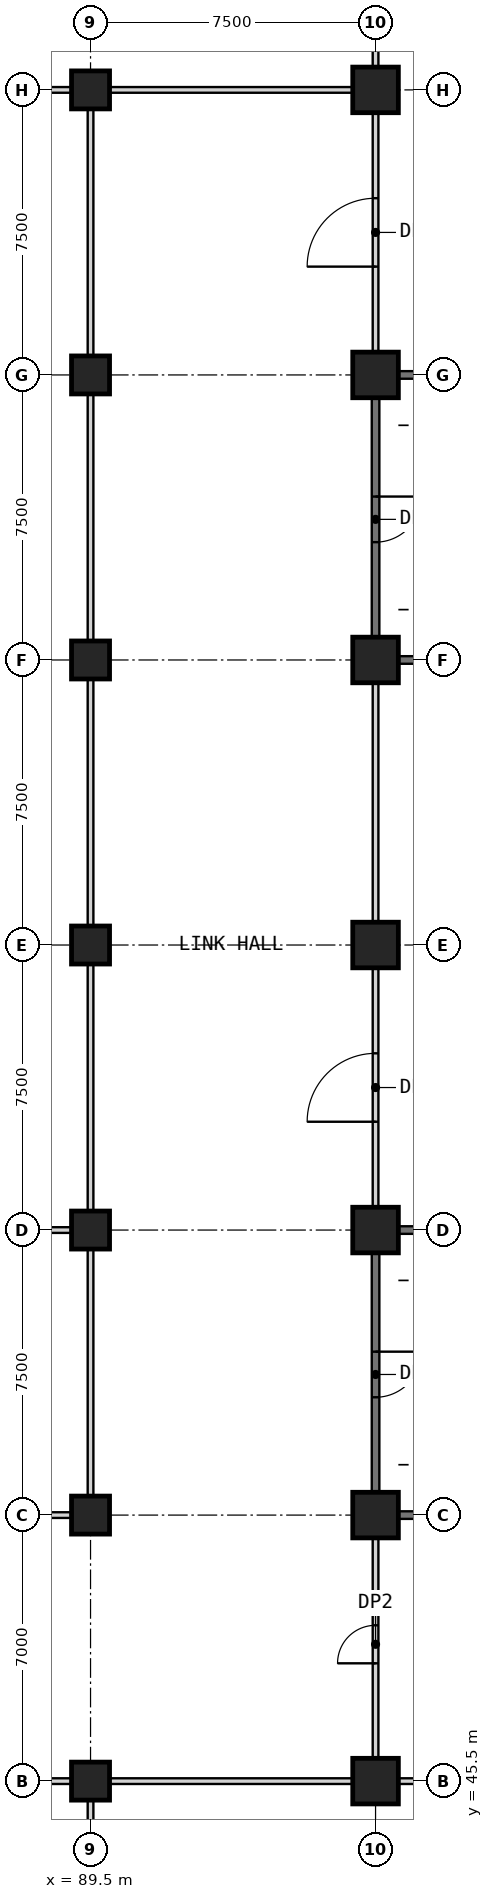
"""IFC4 building model, lengths in metres.
Left out: names, types, materials, properties, quantities, classifications, styles, units other than length and angle.
Written with IfcOpenShell. Run it as: python <this file> out.ifc"""

import sys

from ifc_helpers import new_model, si_unit, direction, frame, frame_2d, origin, origin_2d, place, context, subcontext, project, spatial, rectangle, extrude, element, fill, save


model = new_model("IFC4")
c1 = context("Model", 3, precision=1e-05, world=origin(), true_north=direction((0.0, 1.0)))
c2 = subcontext(c1, "Body", "Model", "MODEL_VIEW")
j1 = project(units=[si_unit("LENGTHUNIT", "METRE"), si_unit("PLANEANGLEUNIT", "RADIAN")], contexts=[c1])
p1 = place(None, origin())
s1 = spatial("IfcSite", under=j1, at=p1, CompositionType="ELEMENT")
p2 = place(p1, origin())
s2 = spatial("IfcBuilding", under=s1, at=p2, CompositionType="ELEMENT")
p3 = place(p2, frame((0.0, 0.0, 13.5)))
s3 = spatial("IfcBuildingStorey", under=s2, at=p3, CompositionType="ELEMENT", Elevation=13.5)
for number, where, z_axis, x_axis in (
    (1, (89.5, 45.5, 0.0), (0.0, 0.0, 1.0), (1.0, 0.0, 0.0)),
    (2, (89.5, 52.5, 0.0), (0.0, 0.0, 1.0), (1.0, 0.0, 0.0)),
    (3, (89.5, 60.0, 0.0), (0.0, 0.0, 1.0), (1.0, 0.0, 0.0)),
    (4, (89.5, 67.5, 0.0), (0.0, 0.0, 1.0), (1.0, 0.0, 0.0)),
    (5, (89.5, 75.0, 0.0), (0.0, 0.0, 1.0), (1.0, 0.0, 0.0)),
    (6, (89.5, 82.5, 0.0), (0.0, 0.0, 1.0), (1.0, 0.0, 0.0)),
    (7, (89.5, 90.0, 0.0), (0.0, 0.0, 1.0), (1.0, 0.0, 0.0)),
):
    element("IfcColumn", number, at=place(p3, frame(where, z_axis=z_axis, x_axis=x_axis)), inside=s3, PredefinedType="COLUMN", context=c2, shape_type="SweptSolid", body=[
        extrude(rectangle(XDim=1.0, YDim=1.0, at=origin_2d()), origin(), (0.0, 0.0, 1.0), 5.0),
    ])
for number, where, z_axis, x_axis in (
    (8, (97.0, 45.5, 0.0), (0.0, 0.0, 1.0), (1.0, 0.0, 0.0)),
    (9, (97.0, 52.5, 0.0), (0.0, 0.0, 1.0), (1.0, 0.0, 0.0)),
    (10, (97.0, 60.0, 0.0), (0.0, 0.0, 1.0), (1.0, 0.0, 0.0)),
    (11, (97.0, 67.5, 0.0), (0.0, 0.0, 1.0), (1.0, 0.0, 0.0)),
    (12, (97.0, 75.0, 0.0), (0.0, 0.0, 1.0), (1.0, 0.0, 0.0)),
    (13, (97.0, 82.5, 0.0), (0.0, 0.0, 1.0), (1.0, 0.0, 0.0)),
    (14, (97.0, 90.0, 0.0), (0.0, 0.0, 1.0), (1.0, 0.0, 0.0)),
):
    element("IfcColumn", number, at=place(p3, frame(where, z_axis=z_axis, x_axis=x_axis)), inside=s3, PredefinedType="COLUMN", context=c2, shape_type="SweptSolid", body=[
        extrude(rectangle(XDim=1.2, YDim=1.2, at=origin_2d()), origin(), (0.0, 0.0, 1.0), 5.0),
    ])
for number, where, z_axis, x_axis in (
    (15, (82.6, 45.5, 0.0), (0.0, 0.0, 1.0), (1.0, 0.0, 0.0)),
    (16, (90.0, 45.5, 0.0), (0.0, 0.0, 1.0), (1.0, 0.0, 0.0)),
):
    element("IfcWall", number, at=place(p3, frame(where, z_axis=z_axis, x_axis=x_axis)), inside=s3, PredefinedType="PARTITIONING", context=c2, shape_type="SweptSolid", body=[
        extrude(rectangle(XDim=6.4, YDim=0.15, at=frame_2d((3.2, 0.0))), origin(), (0.0, 0.0, 1.0), 4.7),
    ])
p4 = place(p3, frame((97.6, 45.5, 0.0), z_axis=(0.0, 0.0, 1.0), x_axis=(1.0, 0.0, 0.0)))
e17 = element("IfcWall", 17, at=p4, inside=s3, PredefinedType="PARTITIONING", context=c2, shape_type="SweptSolid", body=[
    extrude(rectangle(XDim=6.3, YDim=0.15, at=frame_2d((3.15, 0.0))), origin(), (0.0, 0.0, 1.0), 4.7),
])
p5 = place(p4, frame((2.25, 0.0, 0.0)))
e18 = element("IfcOpeningElement", 18, at=p5, cuts=e17, PredefinedType="OPENING", context=c2, shape_type="SweptSolid", body=[
    extrude(rectangle(XDim=1.8, YDim=2.4, at=frame_2d((0.9, 1.2))), frame((0.0, 0.085, 0.0), z_axis=(0.0, -1.0, 0.0), x_axis=(1.0, 0.0, 0.0)), (0.0, 0.0, 1.0), 0.17),
])
p6 = place(p3, frame((89.0, 52.5, 0.0), z_axis=(0.0, 0.0, 1.0), x_axis=(-1.0, 0.0, 0.0)))
e19 = element("IfcWall", 19, at=p6, inside=s3, PredefinedType="PARTITIONING", context=c2, shape_type="SweptSolid", body=[
    extrude(rectangle(XDim=6.4, YDim=0.15, at=frame_2d((3.2, 0.0))), origin(), (0.0, 0.0, 1.0), 4.7),
])
p7 = place(p6, frame((2.35, 0.0, 0.0)))
e20 = element("IfcOpeningElement", 20, at=p7, cuts=e19, PredefinedType="OPENING", context=c2, shape_type="SweptSolid", body=[
    extrude(rectangle(XDim=1.8, YDim=2.4, at=frame_2d((0.9, 1.2))), frame((0.0, 0.085, 0.0), z_axis=(0.0, -1.0, 0.0), x_axis=(1.0, 0.0, 0.0)), (0.0, 0.0, 1.0), 0.17),
])
p8 = place(p3, frame((97.6, 52.5, 0.0), z_axis=(0.0, 0.0, 1.0), x_axis=(1.0, 0.0, 0.0)))
e21 = element("IfcWall", 21, at=p8, inside=s3, PredefinedType="SHEAR", context=c2, shape_type="SweptSolid", body=[
    extrude(rectangle(XDim=6.3, YDim=0.2, at=frame_2d((3.15, 0.0))), origin(), (0.0, 0.0, 1.0), 4.7),
])
p9 = place(p3, frame((82.6, 60.0, 0.0), z_axis=(0.0, 0.0, 1.0), x_axis=(1.0, 0.0, 0.0)))
e22 = element("IfcWall", 22, at=p9, inside=s3, PredefinedType="PARTITIONING", context=c2, shape_type="SweptSolid", body=[
    extrude(rectangle(XDim=6.4, YDim=0.15, at=frame_2d((3.2, 0.0))), origin(), (0.0, 0.0, 1.0), 4.7),
])
for number, where, z_axis, x_axis in (
    (23, (97.6, 60.0, 0.0), (0.0, 0.0, 1.0), (1.0, 0.0, 0.0)),
    (24, (97.6, 75.0, 0.0), (0.0, 0.0, 1.0), (1.0, 0.0, 0.0)),
    (25, (97.6, 82.5, 0.0), (0.0, 0.0, 1.0), (1.0, 0.0, 0.0)),
):
    element("IfcWall", number, at=place(p3, frame(where, z_axis=z_axis, x_axis=x_axis)), inside=s3, PredefinedType="SHEAR", context=c2, shape_type="SweptSolid", body=[
        extrude(rectangle(XDim=6.3, YDim=0.2, at=frame_2d((3.15, 0.0))), origin(), (0.0, 0.0, 1.0), 4.7),
    ])
for number, where, z_axis, x_axis in (
    (26, (82.6, 90.0, 0.0), (0.0, 0.0, 1.0), (1.0, 0.0, 0.0)),
    (27, (90.0, 90.0, 0.0), (0.0, 0.0, 1.0), (1.0, 0.0, 0.0)),
):
    element("IfcWall", number, at=place(p3, frame(where, z_axis=z_axis, x_axis=x_axis)), inside=s3, PredefinedType="PARTITIONING", context=c2, shape_type="SweptSolid", body=[
        extrude(rectangle(XDim=6.4, YDim=0.15, at=frame_2d((3.2, 0.0))), origin(), (0.0, 0.0, 1.0), 4.7),
    ])
p10 = place(p3, frame((97.0, 46.1, 0.0), z_axis=(0.0, 0.0, 1.0), x_axis=(0.0, 1.0, 0.0)))
e28 = element("IfcWall", 28, at=p10, inside=s3, PredefinedType="PARTITIONING", context=c2, shape_type="SweptSolid", body=[
    extrude(rectangle(XDim=5.8, YDim=0.15, at=frame_2d((2.9, 0.0))), origin(), (0.0, 0.0, 1.0), 4.7),
])
p11 = place(p10, frame((2.5, 0.0, 0.0)))
e29 = element("IfcOpeningElement", 29, at=p11, cuts=e28, PredefinedType="OPENING", context=c2, shape_type="SweptSolid", body=[
    extrude(rectangle(XDim=1.0, YDim=2.1, at=frame_2d((0.5, 1.05))), frame((0.0, 0.085, 0.0), z_axis=(0.0, -1.0, 0.0), x_axis=(1.0, 0.0, 0.0)), (0.0, 0.0, 1.0), 0.17),
])
p12 = place(p3, frame((97.0, 59.4, 0.0), z_axis=(0.0, 0.0, 1.0), x_axis=(0.0, -1.0, 0.0)))
e30 = element("IfcWall", 30, at=p12, inside=s3, PredefinedType="SHEAR", context=c2, shape_type="SweptSolid", body=[
    extrude(rectangle(XDim=6.3, YDim=0.2, at=frame_2d((3.15, 0.0))), origin(), (0.0, 0.0, 1.0), 4.7),
])
p13 = place(p12, frame((2.6, 0.0, 0.0)))
e31 = element("IfcOpeningElement", 31, at=p13, cuts=e30, PredefinedType="OPENING", context=c2, shape_type="SweptSolid", body=[
    extrude(rectangle(XDim=1.2, YDim=2.1, at=frame_2d((0.6, 1.05))), frame((0.0, 0.11, 0.0), z_axis=(0.0, -1.0, 0.0), x_axis=(1.0, 0.0, 0.0)), (0.0, 0.0, 1.0), 0.22),
])
p14 = place(p3, frame((97.0, 60.6, 0.0), z_axis=(0.0, 0.0, 1.0), x_axis=(0.0, 1.0, 0.0)))
e32 = element("IfcWall", 32, at=p14, inside=s3, PredefinedType="PARTITIONING", context=c2, shape_type="SweptSolid", body=[
    extrude(rectangle(XDim=6.3, YDim=0.15, at=frame_2d((3.15, 0.0))), origin(), (0.0, 0.0, 1.0), 4.7),
])
p15 = place(p14, frame((2.25, 0.0, 0.0)))
e33 = element("IfcOpeningElement", 33, at=p15, cuts=e32, PredefinedType="OPENING", context=c2, shape_type="SweptSolid", body=[
    extrude(rectangle(XDim=1.8, YDim=2.4, at=frame_2d((0.9, 1.2))), frame((0.0, 0.085, 0.0), z_axis=(0.0, -1.0, 0.0), x_axis=(1.0, 0.0, 0.0)), (0.0, 0.0, 1.0), 0.17),
])
p16 = place(p3, frame((97.0, 68.1, 0.0), z_axis=(0.0, 0.0, 1.0), x_axis=(0.0, 1.0, 0.0)))
e34 = element("IfcWall", 34, at=p16, inside=s3, PredefinedType="PARTITIONING", context=c2, shape_type="SweptSolid", body=[
    extrude(rectangle(XDim=6.3, YDim=0.15, at=frame_2d((3.15, 0.0))), origin(), (0.0, 0.0, 1.0), 4.7),
])
p17 = place(p3, frame((97.0, 81.9, 0.0), z_axis=(0.0, 0.0, 1.0), x_axis=(0.0, -1.0, 0.0)))
e35 = element("IfcWall", 35, at=p17, inside=s3, PredefinedType="SHEAR", context=c2, shape_type="SweptSolid", body=[
    extrude(rectangle(XDim=6.3, YDim=0.2, at=frame_2d((3.15, 0.0))), origin(), (0.0, 0.0, 1.0), 4.7),
])
p18 = place(p17, frame((2.6, 0.0, 0.0)))
e36 = element("IfcOpeningElement", 36, at=p18, cuts=e35, PredefinedType="OPENING", context=c2, shape_type="SweptSolid", body=[
    extrude(rectangle(XDim=1.2, YDim=2.1, at=frame_2d((0.6, 1.05))), frame((0.0, 0.11, 0.0), z_axis=(0.0, -1.0, 0.0), x_axis=(1.0, 0.0, 0.0)), (0.0, 0.0, 1.0), 0.22),
])
p19 = place(p3, frame((97.0, 83.1, 0.0), z_axis=(0.0, 0.0, 1.0), x_axis=(0.0, 1.0, 0.0)))
e37 = element("IfcWall", 37, at=p19, inside=s3, PredefinedType="PARTITIONING", context=c2, shape_type="SweptSolid", body=[
    extrude(rectangle(XDim=6.3, YDim=0.15, at=frame_2d((3.15, 0.0))), origin(), (0.0, 0.0, 1.0), 4.7),
])
p20 = place(p19, frame((2.25, 0.0, 0.0)))
e38 = element("IfcOpeningElement", 38, at=p20, cuts=e37, PredefinedType="OPENING", context=c2, shape_type="SweptSolid", body=[
    extrude(rectangle(XDim=1.8, YDim=2.4, at=frame_2d((0.9, 1.2))), frame((0.0, 0.085, 0.0), z_axis=(0.0, -1.0, 0.0), x_axis=(1.0, 0.0, 0.0)), (0.0, 0.0, 1.0), 0.17),
])
p21 = place(p3, frame((97.0, 90.6, 0.0), z_axis=(0.0, 0.0, 1.0), x_axis=(0.0, 1.0, 0.0)))
e39 = element("IfcWall", 39, at=p21, inside=s3, PredefinedType="PARTITIONING", context=c2, shape_type="SweptSolid", body=[
    extrude(rectangle(XDim=5.8, YDim=0.15, at=frame_2d((2.9, 0.0))), origin(), (0.0, 0.0, 1.0), 4.7),
])
p22 = place(p3, frame((89.5, 38.6, 0.0), z_axis=(0.0, 0.0, 1.0), x_axis=(0.0, 1.0, 0.0)))
e40 = element("IfcWall", 40, at=p22, inside=s3, PredefinedType="PARTITIONING", context=c2, shape_type="SweptSolid", body=[
    extrude(rectangle(XDim=6.4, YDim=0.15, at=frame_2d((3.2, 0.0))), origin(), (0.0, 0.0, 1.0), 4.7),
])
for number, where, z_axis, x_axis in (
    (41, (89.5, 53.0, 0.0), (0.0, 0.0, 1.0), (0.0, 1.0, 0.0)),
    (42, (89.5, 60.5, 0.0), (0.0, 0.0, 1.0), (0.0, 1.0, 0.0)),
    (43, (89.5, 68.0, 0.0), (0.0, 0.0, 1.0), (0.0, 1.0, 0.0)),
    (44, (89.5, 75.5, 0.0), (0.0, 0.0, 1.0), (0.0, 1.0, 0.0)),
    (45, (89.5, 83.0, 0.0), (0.0, 0.0, 1.0), (0.0, 1.0, 0.0)),
):
    element("IfcWall", number, at=place(p3, frame(where, z_axis=z_axis, x_axis=x_axis)), inside=s3, PredefinedType="PARTITIONING", context=c2, shape_type="SweptSolid", body=[
        extrude(rectangle(XDim=6.5, YDim=0.15, at=frame_2d((3.25, 0.0))), origin(), (0.0, 0.0, 1.0), 4.7),
    ])
p23 = place(p11, origin())
e46 = element("IfcDoor", 46, at=p23, inside=s3, OperationType="SINGLE_SWING_LEFT", PredefinedType="DOOR", context=c2, shape_type="SweptSolid", body=[
    extrude(rectangle(XDim=1.0, YDim=2.1, at=frame_2d((0.5, 1.05))), frame((0.0, 0.025, 0.0), z_axis=(0.0, -1.0, 0.0), x_axis=(1.0, 0.0, 0.0)), (0.0, 0.0, 1.0), 0.05),
])
fill(e29, e46)
p24 = place(p13, origin())
e47 = element("IfcDoor", 47, at=p24, inside=s3, OperationType="SINGLE_SWING_LEFT", PredefinedType="DOOR", context=c2, shape_type="SweptSolid", body=[
    extrude(rectangle(XDim=1.2, YDim=2.1, at=frame_2d((0.6, 1.05))), frame((0.0, 0.025, 0.0), z_axis=(0.0, -1.0, 0.0), x_axis=(1.0, 0.0, 0.0)), (0.0, 0.0, 1.0), 0.05),
])
fill(e31, e47)
p25 = place(p15, origin())
e48 = element("IfcDoor", 48, at=p25, inside=s3, OperationType="SINGLE_SWING_LEFT", PredefinedType="DOOR", context=c2, shape_type="SweptSolid", body=[
    extrude(rectangle(XDim=1.8, YDim=2.4, at=frame_2d((0.9, 1.2))), frame((0.0, 0.025, 0.0), z_axis=(0.0, -1.0, 0.0), x_axis=(1.0, 0.0, 0.0)), (0.0, 0.0, 1.0), 0.05),
])
fill(e33, e48)
p26 = place(p18, origin())
e49 = element("IfcDoor", 49, at=p26, inside=s3, OperationType="SINGLE_SWING_LEFT", PredefinedType="DOOR", context=c2, shape_type="SweptSolid", body=[
    extrude(rectangle(XDim=1.2, YDim=2.1, at=frame_2d((0.6, 1.05))), frame((0.0, 0.025, 0.0), z_axis=(0.0, -1.0, 0.0), x_axis=(1.0, 0.0, 0.0)), (0.0, 0.0, 1.0), 0.05),
])
fill(e36, e49)
p27 = place(p20, origin())
e50 = element("IfcDoor", 50, at=p27, inside=s3, OperationType="SINGLE_SWING_LEFT", PredefinedType="DOOR", context=c2, shape_type="SweptSolid", body=[
    extrude(rectangle(XDim=1.8, YDim=2.4, at=frame_2d((0.9, 1.2))), frame((0.0, 0.025, 0.0), z_axis=(0.0, -1.0, 0.0), x_axis=(1.0, 0.0, 0.0)), (0.0, 0.0, 1.0), 0.05),
])
fill(e38, e50)
save(model, sys.argv[1])
